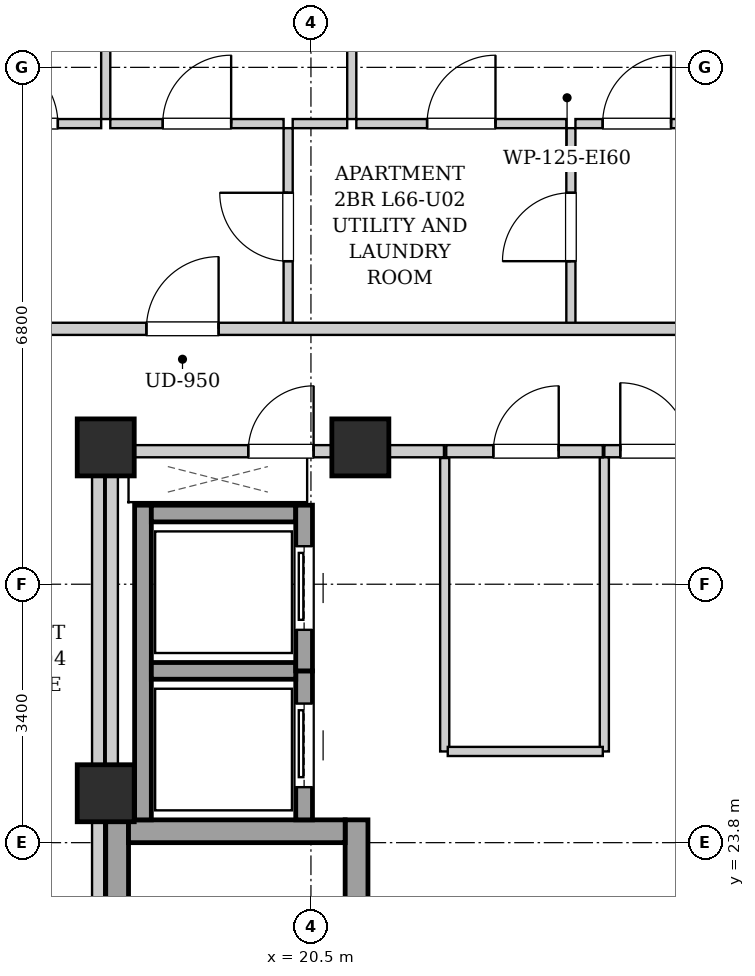
"""IFC4 building model, lengths in metres.
Left out: names, types, materials, properties, quantities, classifications, styles, units other than length and angle.
Written with IfcOpenShell. Run it as: python <this file> out.ifc"""

import sys

from ifc_helpers import new_model, si_unit, direction, frame, frame_2d, origin, origin_2d, place, context, subcontext, project, spatial, rectangle, extrude, element, fill, save


model = new_model("IFC4")
c1 = context("Model", 3, precision=1e-05, world=origin(), true_north=direction((0.0, 1.0)))
c2 = subcontext(c1, "Body", "Model", "MODEL_VIEW")
j1 = project(units=[si_unit("LENGTHUNIT", "METRE"), si_unit("PLANEANGLEUNIT", "RADIAN")], contexts=[c1])
p1 = place(None, origin())
s1 = spatial("IfcSite", under=j1, at=p1, CompositionType="ELEMENT")
p2 = place(p1, origin())
s2 = spatial("IfcBuilding", under=s1, at=p2, CompositionType="ELEMENT")
p3 = place(p2, frame((0.0, 0.0, 227.5)))
s3 = spatial("IfcBuildingStorey", under=s2, at=p3, CompositionType="ELEMENT", Elevation=227.5)
for number, where, z_axis, x_axis in (
    (1, (17.8, 29.0, 0.0), (0.0, 0.0, 1.0), (1.0, 0.0, 0.0)),
    (2, (21.15, 29.0, 0.0), (0.0, 0.0, 1.0), (1.0, 0.0, 0.0)),
    (3, (17.8, 24.45, 0.0), (0.0, 0.0, 1.0), (1.0, 0.0, 0.0)),
):
    element("IfcColumn", number, at=place(p3, frame(where, z_axis=z_axis, x_axis=x_axis)), inside=s3, PredefinedType="COLUMN", context=c2, shape_type="SweptSolid", body=[
        extrude(rectangle(XDim=0.75, YDim=0.75, at=origin_2d()), origin(), (0.0, 0.0, 1.0), 3.4),
    ])
for number, where, z_axis, x_axis in (
    (4, (17.95, 15.1, 0.0), (0.0, 0.0, 1.0), (0.0, 1.0, 0.0)),
    (5, (21.1, 15.1, 0.0), (0.0, 0.0, 1.0), (0.0, 1.0, 0.0)),
):
    element("IfcWall", number, at=place(p3, frame(where, z_axis=z_axis, x_axis=x_axis)), inside=s3, PredefinedType="SHEAR", context=c2, shape_type="SweptSolid", body=[
        extrude(rectangle(XDim=9.0, YDim=0.3, at=frame_2d((4.5, 0.0))), origin(), (0.0, 0.0, 1.0), 3.14),
    ])
p4 = place(p3, frame((18.1, 23.95, 0.0), z_axis=(0.0, 0.0, 1.0), x_axis=(1.0, 0.0, 0.0)))
e6 = element("IfcWall", 6, at=p4, inside=s3, PredefinedType="SHEAR", context=c2, shape_type="SweptSolid", body=[
    extrude(rectangle(XDim=2.85, YDim=0.3, at=frame_2d((1.425, 0.0))), origin(), (0.0, 0.0, 1.0), 3.14),
])
p5 = place(p3, frame((18.29, 24.1, 0.0), z_axis=(0.0, 0.0, 1.0), x_axis=(0.0, 1.0, 0.0)))
e7 = element("IfcWall", 7, at=p5, inside=s3, PredefinedType="SHEAR", context=c2, shape_type="SweptSolid", body=[
    extrude(rectangle(XDim=4.14, YDim=0.22, at=frame_2d((2.07, 0.0))), origin(), (0.0, 0.0, 1.0), 3.14),
])
p6 = place(p3, frame((20.41, 24.1, 0.0), z_axis=(0.0, 0.0, 1.0), x_axis=(0.0, 1.0, 0.0)))
e8 = element("IfcWall", 8, at=p6, inside=s3, PredefinedType="SHEAR", context=c2, shape_type="SweptSolid", body=[
    extrude(rectangle(XDim=1.96, YDim=0.22, at=frame_2d((0.98, 0.0))), origin(), (0.0, 0.0, 1.0), 3.14),
])
p7 = place(p6, frame((0.43, 0.0, 0.0)))
e9 = element("IfcOpeningElement", 9, at=p7, cuts=e8, PredefinedType="OPENING", context=c2, shape_type="SweptSolid", body=[
    extrude(rectangle(XDim=1.1, YDim=2.15, at=frame_2d((0.55, 1.075))), frame((0.0, 0.12, 0.0), z_axis=(0.0, -1.0, 0.0), x_axis=(1.0, 0.0, 0.0)), (0.0, 0.0, 1.0), 0.24),
])
for number, where, z_axis, x_axis in (
    (10, (18.4, 26.06, 0.0), (0.0, 0.0, 1.0), (1.0, 0.0, 0.0)),
    (11, (18.4, 28.13, 0.0), (0.0, 0.0, 1.0), (1.0, 0.0, 0.0)),
):
    element("IfcWall", number, at=place(p3, frame(where, z_axis=z_axis, x_axis=x_axis)), inside=s3, PredefinedType="SHEAR", context=c2, shape_type="SweptSolid", body=[
        extrude(rectangle(XDim=1.9, YDim=0.22, at=frame_2d((0.95, 0.0))), origin(), (0.0, 0.0, 1.0), 3.14),
    ])
p8 = place(p3, frame((20.41, 26.06, 0.0), z_axis=(0.0, 0.0, 1.0), x_axis=(0.0, 1.0, 0.0)))
e12 = element("IfcWall", 12, at=p8, inside=s3, PredefinedType="SHEAR", context=c2, shape_type="SweptSolid", body=[
    extrude(rectangle(XDim=2.18, YDim=0.22, at=frame_2d((1.09, 0.0))), origin(), (0.0, 0.0, 1.0), 3.14),
])
p9 = place(p8, frame((0.54, 0.0, 0.0)))
e13 = element("IfcOpeningElement", 13, at=p9, cuts=e12, PredefinedType="OPENING", context=c2, shape_type="SweptSolid", body=[
    extrude(rectangle(XDim=1.1, YDim=2.15, at=frame_2d((0.55, 1.075))), frame((0.0, 0.12, 0.0), z_axis=(0.0, -1.0, 0.0), x_axis=(1.0, 0.0, 0.0)), (0.0, 0.0, 1.0), 0.24),
])
p10 = place(p3, frame((17.88, 24.12, 0.0), z_axis=(0.0, 0.0, 1.0), x_axis=(0.0, 1.0, 0.0)))
e14 = element("IfcWall", 14, at=p10, inside=s3, PredefinedType="PARTITIONING", context=c2, shape_type="SweptSolid", body=[
    extrude(rectangle(XDim=4.76, YDim=0.16, at=frame_2d((2.38, 0.0))), origin(), (0.0, 0.0, 1.0), 2.475),
])
p11 = place(p3, frame((24.36, 28.95, 0.0), z_axis=(0.0, 0.0, 1.0), x_axis=(1.0, 0.0, 0.0)))
e15 = element("IfcWall", 15, at=p11, inside=s3, PredefinedType="PARTITIONING", context=c2, shape_type="SweptSolid", body=[
    extrude(rectangle(XDim=1.32, YDim=0.16, at=frame_2d((0.66, 0.0))), origin(), (0.0, 0.0, 1.0), 2.668),
])
p12 = place(p11, frame((0.21, 0.0, 0.0)))
e16 = element("IfcOpeningElement", 16, at=p12, cuts=e15, PredefinedType="OPENING", context=c2, shape_type="SweptSolid", body=[
    extrude(rectangle(XDim=0.9, YDim=2.05, at=frame_2d((0.45, 1.025))), frame((0.0, 0.09, 0.0), z_axis=(0.0, -1.0, 0.0), x_axis=(1.0, 0.0, 0.0)), (0.0, 0.0, 1.0), 0.18),
])
p13 = place(p3, frame((17.96, 28.95, 0.0), z_axis=(0.0, 0.0, 1.0), x_axis=(1.0, 0.0, 0.0)))
e17 = element("IfcWall", 17, at=p13, inside=s3, PredefinedType="PARTITIONING", context=c2, shape_type="SweptSolid", body=[
    extrude(rectangle(XDim=4.29, YDim=0.16, at=frame_2d((2.145, 0.0))), origin(), (0.0, 0.0, 1.0), 2.668),
])
p14 = place(p13, frame((1.715, 0.0, 0.0)))
e18 = element("IfcOpeningElement", 18, at=p14, cuts=e17, PredefinedType="OPENING", context=c2, shape_type="SweptSolid", body=[
    extrude(rectangle(XDim=0.86, YDim=2.05, at=frame_2d((0.43, 1.025))), frame((0.0, 0.09, 0.0), z_axis=(0.0, -1.0, 0.0), x_axis=(1.0, 0.0, 0.0)), (0.0, 0.0, 1.0), 0.18),
])
p15 = place(p3, frame((24.36, 25.0, 0.0), z_axis=(0.0, 0.0, 1.0), x_axis=(0.0, 1.0, 0.0)))
e19 = element("IfcWall", 19, at=p15, inside=s3, PredefinedType="PARTITIONING", context=c2, shape_type="SweptSolid", body=[
    extrude(rectangle(XDim=3.87, YDim=0.12, at=frame_2d((1.935, 0.0))), origin(), (0.0, 0.0, 1.0), 3.14),
])
p16 = place(p3, frame((22.26, 25.0, 0.0), z_axis=(0.0, 0.0, 1.0), x_axis=(0.0, 1.0, 0.0)))
e20 = element("IfcWall", 20, at=p16, inside=s3, PredefinedType="PARTITIONING", context=c2, shape_type="SweptSolid", body=[
    extrude(rectangle(XDim=3.86, YDim=0.12, at=frame_2d((1.93, 0.0))), origin(), (0.0, 0.0, 1.0), 3.14),
])
p17 = place(p3, frame((22.3, 25.0, 0.0), z_axis=(0.0, 0.0, 1.0), x_axis=(1.0, 0.0, 0.0)))
e21 = element("IfcWall", 21, at=p17, inside=s3, PredefinedType="PARTITIONING", context=c2, shape_type="SweptSolid", body=[
    extrude(rectangle(XDim=2.04, YDim=0.12, at=frame_2d((1.02, 0.0))), origin(), (0.0, 0.0, 1.0), 3.14),
])
p18 = place(p3, frame((22.28, 28.95, 0.0), z_axis=(0.0, 0.0, 1.0), x_axis=(1.0, 0.0, 0.0)))
e22 = element("IfcWall", 22, at=p18, inside=s3, PredefinedType="PARTITIONING", context=c2, shape_type="SweptSolid", body=[
    extrude(rectangle(XDim=2.06, YDim=0.16, at=frame_2d((1.03, 0.0))), origin(), (0.0, 0.0, 1.0), 2.668),
])
p19 = place(p18, frame((0.62, 0.0, 0.0)))
e23 = element("IfcOpeningElement", 23, at=p19, cuts=e22, PredefinedType="OPENING", context=c2, shape_type="SweptSolid", body=[
    extrude(rectangle(XDim=0.86, YDim=2.05, at=frame_2d((0.43, 1.025))), frame((0.0, 0.09, 0.0), z_axis=(0.0, -1.0, 0.0), x_axis=(1.0, 0.0, 0.0)), (0.0, 0.0, 1.0), 0.18),
])
p20 = place(p3, frame((20.2, 30.6, 0.0), z_axis=(0.0, 0.0, 1.0), x_axis=(0.0, 1.0, 0.0)))
e24 = element("IfcWall", 24, at=p20, inside=s3, PredefinedType="PARTITIONING", context=c2, shape_type="SweptSolid", body=[
    extrude(rectangle(XDim=2.6, YDim=0.12, at=frame_2d((1.3, 0.0))), origin(), (0.0, 0.0, 1.0), 3.14),
])
p21 = place(p20, frame((0.85, 0.0, 0.0)))
e25 = element("IfcOpeningElement", 25, at=p21, cuts=e24, PredefinedType="OPENING", context=c2, shape_type="SweptSolid", body=[
    extrude(rectangle(XDim=0.9, YDim=2.05, at=frame_2d((0.45, 1.025))), frame((0.0, 0.07, 0.0), z_axis=(0.0, -1.0, 0.0), x_axis=(1.0, 0.0, 0.0)), (0.0, 0.0, 1.0), 0.14),
])
p22 = place(p3, frame((15.7, 33.26, 0.0), z_axis=(0.0, 0.0, 1.0), x_axis=(1.0, 0.0, 0.0)))
e26 = element("IfcWall", 26, at=p22, inside=s3, PredefinedType="PARTITIONING", context=c2, shape_type="SweptSolid", body=[
    extrude(rectangle(XDim=2.04, YDim=0.12, at=frame_2d((1.02, 0.0))), origin(), (0.0, 0.0, 1.0), 3.14),
])
p23 = place(p22, frame((0.57, 0.0, 0.0)))
e27 = element("IfcOpeningElement", 27, at=p23, cuts=e26, PredefinedType="OPENING", context=c2, shape_type="SweptSolid", body=[
    extrude(rectangle(XDim=0.9, YDim=2.05, at=frame_2d((0.45, 1.025))), frame((0.0, 0.07, 0.0), z_axis=(0.0, -1.0, 0.0), x_axis=(1.0, 0.0, 0.0)), (0.0, 0.0, 1.0), 0.14),
])
p24 = place(p3, frame((17.86, 33.26, 0.0), z_axis=(0.0, 0.0, 1.0), x_axis=(1.0, 0.0, 0.0)))
e28 = element("IfcWall", 28, at=p24, inside=s3, PredefinedType="PARTITIONING", context=c2, shape_type="SweptSolid", body=[
    extrude(rectangle(XDim=2.28, YDim=0.12, at=frame_2d((1.14, 0.0))), origin(), (0.0, 0.0, 1.0), 3.14),
])
p25 = place(p24, frame((0.69, 0.0, 0.0)))
e29 = element("IfcOpeningElement", 29, at=p25, cuts=e28, PredefinedType="OPENING", context=c2, shape_type="SweptSolid", body=[
    extrude(rectangle(XDim=0.9, YDim=2.05, at=frame_2d((0.45, 1.025))), frame((0.0, 0.07, 0.0), z_axis=(0.0, -1.0, 0.0), x_axis=(1.0, 0.0, 0.0)), (0.0, 0.0, 1.0), 0.14),
])
p26 = place(p3, frame((23.92, 30.6, 0.0), z_axis=(0.0, 0.0, 1.0), x_axis=(0.0, 1.0, 0.0)))
e30 = element("IfcWall", 30, at=p26, inside=s3, PredefinedType="PARTITIONING", context=c2, shape_type="SweptSolid", body=[
    extrude(rectangle(XDim=2.6, YDim=0.12, at=frame_2d((1.3, 0.0))), origin(), (0.0, 0.0, 1.0), 3.14),
])
p27 = place(p26, frame((0.85, 0.0, 0.0)))
e31 = element("IfcOpeningElement", 31, at=p27, cuts=e30, PredefinedType="OPENING", context=c2, shape_type="SweptSolid", body=[
    extrude(rectangle(XDim=0.9, YDim=2.05, at=frame_2d((0.45, 1.025))), frame((0.0, 0.07, 0.0), z_axis=(0.0, -1.0, 0.0), x_axis=(1.0, 0.0, 0.0)), (0.0, 0.0, 1.0), 0.14),
])
p28 = place(p3, frame((20.26, 33.26, 0.0), z_axis=(0.0, 0.0, 1.0), x_axis=(1.0, 0.0, 0.0)))
e32 = element("IfcWall", 32, at=p28, inside=s3, PredefinedType="PARTITIONING", context=c2, shape_type="SweptSolid", body=[
    extrude(rectangle(XDim=0.717, YDim=0.12, at=frame_2d((0.358, 0.0))), origin(), (0.0, 0.0, 1.0), 3.14),
])
p29 = place(p3, frame((21.097, 33.26, 0.0), z_axis=(0.0, 0.0, 1.0), x_axis=(1.0, 0.0, 0.0)))
e33 = element("IfcWall", 33, at=p29, inside=s3, PredefinedType="PARTITIONING", context=c2, shape_type="SweptSolid", body=[
    extrude(rectangle(XDim=2.763, YDim=0.12, at=frame_2d((1.382, 0.0))), origin(), (0.0, 0.0, 1.0), 3.14),
])
p30 = place(p29, frame((0.931, 0.0, 0.0)))
e34 = element("IfcOpeningElement", 34, at=p30, cuts=e33, PredefinedType="OPENING", context=c2, shape_type="SweptSolid", body=[
    extrude(rectangle(XDim=0.9, YDim=2.05, at=frame_2d((0.45, 1.025))), frame((0.0, 0.07, 0.0), z_axis=(0.0, -1.0, 0.0), x_axis=(1.0, 0.0, 0.0)), (0.0, 0.0, 1.0), 0.14),
])
p31 = place(p3, frame((23.98, 33.26, 0.0), z_axis=(0.0, 0.0, 1.0), x_axis=(1.0, 0.0, 0.0)))
e35 = element("IfcWall", 35, at=p31, inside=s3, PredefinedType="PARTITIONING", context=c2, shape_type="SweptSolid", body=[
    extrude(rectangle(XDim=1.617, YDim=0.12, at=frame_2d((0.809, 0.0))), origin(), (0.0, 0.0, 1.0), 3.14),
])
p32 = place(p31, frame((0.358, 0.0, 0.0)))
e36 = element("IfcOpeningElement", 36, at=p32, cuts=e35, PredefinedType="OPENING", context=c2, shape_type="SweptSolid", body=[
    extrude(rectangle(XDim=0.9, YDim=2.05, at=frame_2d((0.45, 1.025))), frame((0.0, 0.07, 0.0), z_axis=(0.0, -1.0, 0.0), x_axis=(1.0, 0.0, 0.0)), (0.0, 0.0, 1.0), 0.14),
])
p33 = place(p3, frame((17.8, 33.32, 0.0), z_axis=(0.0, 0.0, 1.0), x_axis=(0.0, 1.0, 0.0)))
e37 = element("IfcWall", 37, at=p33, inside=s3, PredefinedType="PARTITIONING", context=c2, shape_type="SweptSolid", body=[
    extrude(rectangle(XDim=6.6, YDim=0.12, at=frame_2d((3.3, 0.0))), origin(), (0.0, 0.0, 1.0), 2.668),
])
p34 = place(p33, frame((2.835, 0.0, 0.0)))
e38 = element("IfcOpeningElement", 38, at=p34, cuts=e37, PredefinedType="OPENING", context=c2, shape_type="SweptSolid", body=[
    extrude(rectangle(XDim=0.9, YDim=2.05, at=frame_2d((0.45, 1.025))), frame((0.0, 0.07, 0.0), z_axis=(0.0, -1.0, 0.0), x_axis=(1.0, 0.0, 0.0)), (0.0, 0.0, 1.0), 0.14),
])
p35 = place(p3, frame((21.037, 33.32, 0.0), z_axis=(0.0, 0.0, 1.0), x_axis=(0.0, 1.0, 0.0)))
e39 = element("IfcWall", 39, at=p35, inside=s3, PredefinedType="PARTITIONING", context=c2, shape_type="SweptSolid", body=[
    extrude(rectangle(XDim=6.6, YDim=0.12, at=frame_2d((3.3, 0.0))), origin(), (0.0, 0.0, 1.0), 3.14),
])
p36 = place(p35, frame((2.835, 0.0, 0.0)))
e40 = element("IfcOpeningElement", 40, at=p36, cuts=e39, PredefinedType="OPENING", context=c2, shape_type="SweptSolid", body=[
    extrude(rectangle(XDim=0.9, YDim=2.05, at=frame_2d((0.45, 1.025))), frame((0.0, 0.07, 0.0), z_axis=(0.0, -1.0, 0.0), x_axis=(1.0, 0.0, 0.0)), (0.0, 0.0, 1.0), 0.14),
])
p37 = place(p3, frame((13.15, 30.56, 0.0), z_axis=(0.0, 0.0, 1.0), x_axis=(1.0, 0.0, 0.0)))
e41 = element("IfcWall", 41, at=p37, inside=s3, PredefinedType="PARTITIONING", context=c2, shape_type="SweptSolid", body=[
    extrude(rectangle(XDim=24.6, YDim=0.16, at=frame_2d((12.3, 0.0))), origin(), (0.0, 0.0, 1.0), 3.14),
])
p38 = place(p37, frame((5.185, 0.0, 0.0)))
e42 = element("IfcOpeningElement", 42, at=p38, cuts=e41, PredefinedType="OPENING", context=c2, shape_type="SweptSolid", body=[
    extrude(rectangle(XDim=0.95, YDim=2.1, at=frame_2d((0.475, 1.05))), frame((0.0, 0.09, 0.0), z_axis=(0.0, -1.0, 0.0), x_axis=(1.0, 0.0, 0.0)), (0.0, 0.0, 1.0), 0.18),
])
p39 = place(p37, frame((21.55, 0.0, 0.0)))
e43 = element("IfcOpeningElement", 43, at=p39, cuts=e41, PredefinedType="OPENING", context=c2, shape_type="SweptSolid", body=[
    extrude(rectangle(XDim=0.95, YDim=2.1, at=frame_2d((0.475, 1.05))), frame((0.0, 0.09, 0.0), z_axis=(0.0, -1.0, 0.0), x_axis=(1.0, 0.0, 0.0)), (0.0, 0.0, 1.0), 0.18),
])
p40 = place(p3, frame((17.7, 15.02, 0.0), z_axis=(0.0, 0.0, 1.0), x_axis=(0.0, 1.0, 0.0)))
e44 = element("IfcWall", 44, at=p40, inside=s3, PredefinedType="PARTITIONING", context=c2, shape_type="SweptSolid", body=[
    extrude(rectangle(XDim=13.98, YDim=0.16, at=frame_2d((6.99, 0.0))), origin(), (0.0, 0.0, 1.0), 2.475),
])
p41 = place(p7, origin())
e45 = element("IfcDoor", 45, at=p41, inside=s3, OperationType="SLIDING_TO_LEFT", PredefinedType="DOOR", context=c2, shape_type="SweptSolid", body=[
    extrude(rectangle(XDim=1.1, YDim=2.15, at=frame_2d((0.55, 1.075))), frame((0.0, 0.025, 0.0), z_axis=(0.0, -1.0, 0.0), x_axis=(1.0, 0.0, 0.0)), (0.0, 0.0, 1.0), 0.05),
])
fill(e9, e45)
p42 = place(p9, origin())
e46 = element("IfcDoor", 46, at=p42, inside=s3, OperationType="SLIDING_TO_LEFT", PredefinedType="DOOR", context=c2, shape_type="SweptSolid", body=[
    extrude(rectangle(XDim=1.1, YDim=2.15, at=frame_2d((0.55, 1.075))), frame((0.0, 0.025, 0.0), z_axis=(0.0, -1.0, 0.0), x_axis=(1.0, 0.0, 0.0)), (0.0, 0.0, 1.0), 0.05),
])
fill(e13, e46)
p43 = place(p12, origin())
e47 = element("IfcDoor", 47, at=p43, inside=s3, OperationType="SINGLE_SWING_LEFT", PredefinedType="DOOR", context=c2, shape_type="SweptSolid", body=[
    extrude(rectangle(XDim=0.9, YDim=2.05, at=frame_2d((0.45, 1.025))), frame((0.0, 0.025, 0.0), z_axis=(0.0, -1.0, 0.0), x_axis=(1.0, 0.0, 0.0)), (0.0, 0.0, 1.0), 0.05),
])
fill(e16, e47)
p44 = place(p14, origin())
e48 = element("IfcDoor", 48, at=p44, inside=s3, OperationType="SINGLE_SWING_RIGHT", PredefinedType="DOOR", context=c2, shape_type="SweptSolid", body=[
    extrude(rectangle(XDim=0.86, YDim=2.05, at=frame_2d((0.43, 1.025))), frame((0.0, 0.025, 0.0), z_axis=(0.0, -1.0, 0.0), x_axis=(1.0, 0.0, 0.0)), (0.0, 0.0, 1.0), 0.05),
])
fill(e18, e48)
p45 = place(p19, origin())
e49 = element("IfcDoor", 49, at=p45, inside=s3, OperationType="SINGLE_SWING_RIGHT", PredefinedType="DOOR", context=c2, shape_type="SweptSolid", body=[
    extrude(rectangle(XDim=0.86, YDim=2.05, at=frame_2d((0.43, 1.025))), frame((0.0, 0.025, 0.0), z_axis=(0.0, -1.0, 0.0), x_axis=(1.0, 0.0, 0.0)), (0.0, 0.0, 1.0), 0.05),
])
fill(e23, e49)
p46 = place(p21, origin())
e50 = element("IfcDoor", 50, at=p46, inside=s3, OperationType="SINGLE_SWING_RIGHT", PredefinedType="DOOR", context=c2, shape_type="SweptSolid", body=[
    extrude(rectangle(XDim=0.9, YDim=2.05, at=frame_2d((0.45, 1.025))), frame((0.0, 0.025, 0.0), z_axis=(0.0, -1.0, 0.0), x_axis=(1.0, 0.0, 0.0)), (0.0, 0.0, 1.0), 0.05),
])
fill(e25, e50)
p47 = place(p23, origin())
e51 = element("IfcDoor", 51, at=p47, inside=s3, OperationType="SINGLE_SWING_LEFT", PredefinedType="DOOR", context=c2, shape_type="SweptSolid", body=[
    extrude(rectangle(XDim=0.9, YDim=2.05, at=frame_2d((0.45, 1.025))), frame((0.0, 0.025, 0.0), z_axis=(0.0, -1.0, 0.0), x_axis=(1.0, 0.0, 0.0)), (0.0, 0.0, 1.0), 0.05),
])
fill(e27, e51)
p48 = place(p25, origin())
e52 = element("IfcDoor", 52, at=p48, inside=s3, OperationType="SINGLE_SWING_RIGHT", PredefinedType="DOOR", context=c2, shape_type="SweptSolid", body=[
    extrude(rectangle(XDim=0.9, YDim=2.05, at=frame_2d((0.45, 1.025))), frame((0.0, 0.025, 0.0), z_axis=(0.0, -1.0, 0.0), x_axis=(1.0, 0.0, 0.0)), (0.0, 0.0, 1.0), 0.05),
])
fill(e29, e52)
p49 = place(p27, origin())
e53 = element("IfcDoor", 53, at=p49, inside=s3, OperationType="SINGLE_SWING_LEFT", PredefinedType="DOOR", context=c2, shape_type="SweptSolid", body=[
    extrude(rectangle(XDim=0.9, YDim=2.05, at=frame_2d((0.45, 1.025))), frame((0.0, 0.025, 0.0), z_axis=(0.0, -1.0, 0.0), x_axis=(1.0, 0.0, 0.0)), (0.0, 0.0, 1.0), 0.05),
])
fill(e31, e53)
p50 = place(p30, origin())
e54 = element("IfcDoor", 54, at=p50, inside=s3, OperationType="SINGLE_SWING_RIGHT", PredefinedType="DOOR", context=c2, shape_type="SweptSolid", body=[
    extrude(rectangle(XDim=0.9, YDim=2.05, at=frame_2d((0.45, 1.025))), frame((0.0, 0.025, 0.0), z_axis=(0.0, -1.0, 0.0), x_axis=(1.0, 0.0, 0.0)), (0.0, 0.0, 1.0), 0.05),
])
fill(e34, e54)
p51 = place(p32, origin())
e55 = element("IfcDoor", 55, at=p51, inside=s3, OperationType="SINGLE_SWING_RIGHT", PredefinedType="DOOR", context=c2, shape_type="SweptSolid", body=[
    extrude(rectangle(XDim=0.9, YDim=2.05, at=frame_2d((0.45, 1.025))), frame((0.0, 0.025, 0.0), z_axis=(0.0, -1.0, 0.0), x_axis=(1.0, 0.0, 0.0)), (0.0, 0.0, 1.0), 0.05),
])
fill(e36, e55)
p52 = place(p38, origin())
e56 = element("IfcDoor", 56, at=p52, inside=s3, OperationType="SINGLE_SWING_RIGHT", PredefinedType="DOOR", context=c2, shape_type="SweptSolid", body=[
    extrude(rectangle(XDim=0.95, YDim=2.1, at=frame_2d((0.475, 1.05))), frame((0.0, 0.025, 0.0), z_axis=(0.0, -1.0, 0.0), x_axis=(1.0, 0.0, 0.0)), (0.0, 0.0, 1.0), 0.05),
])
fill(e42, e56)
save(model, sys.argv[1])
